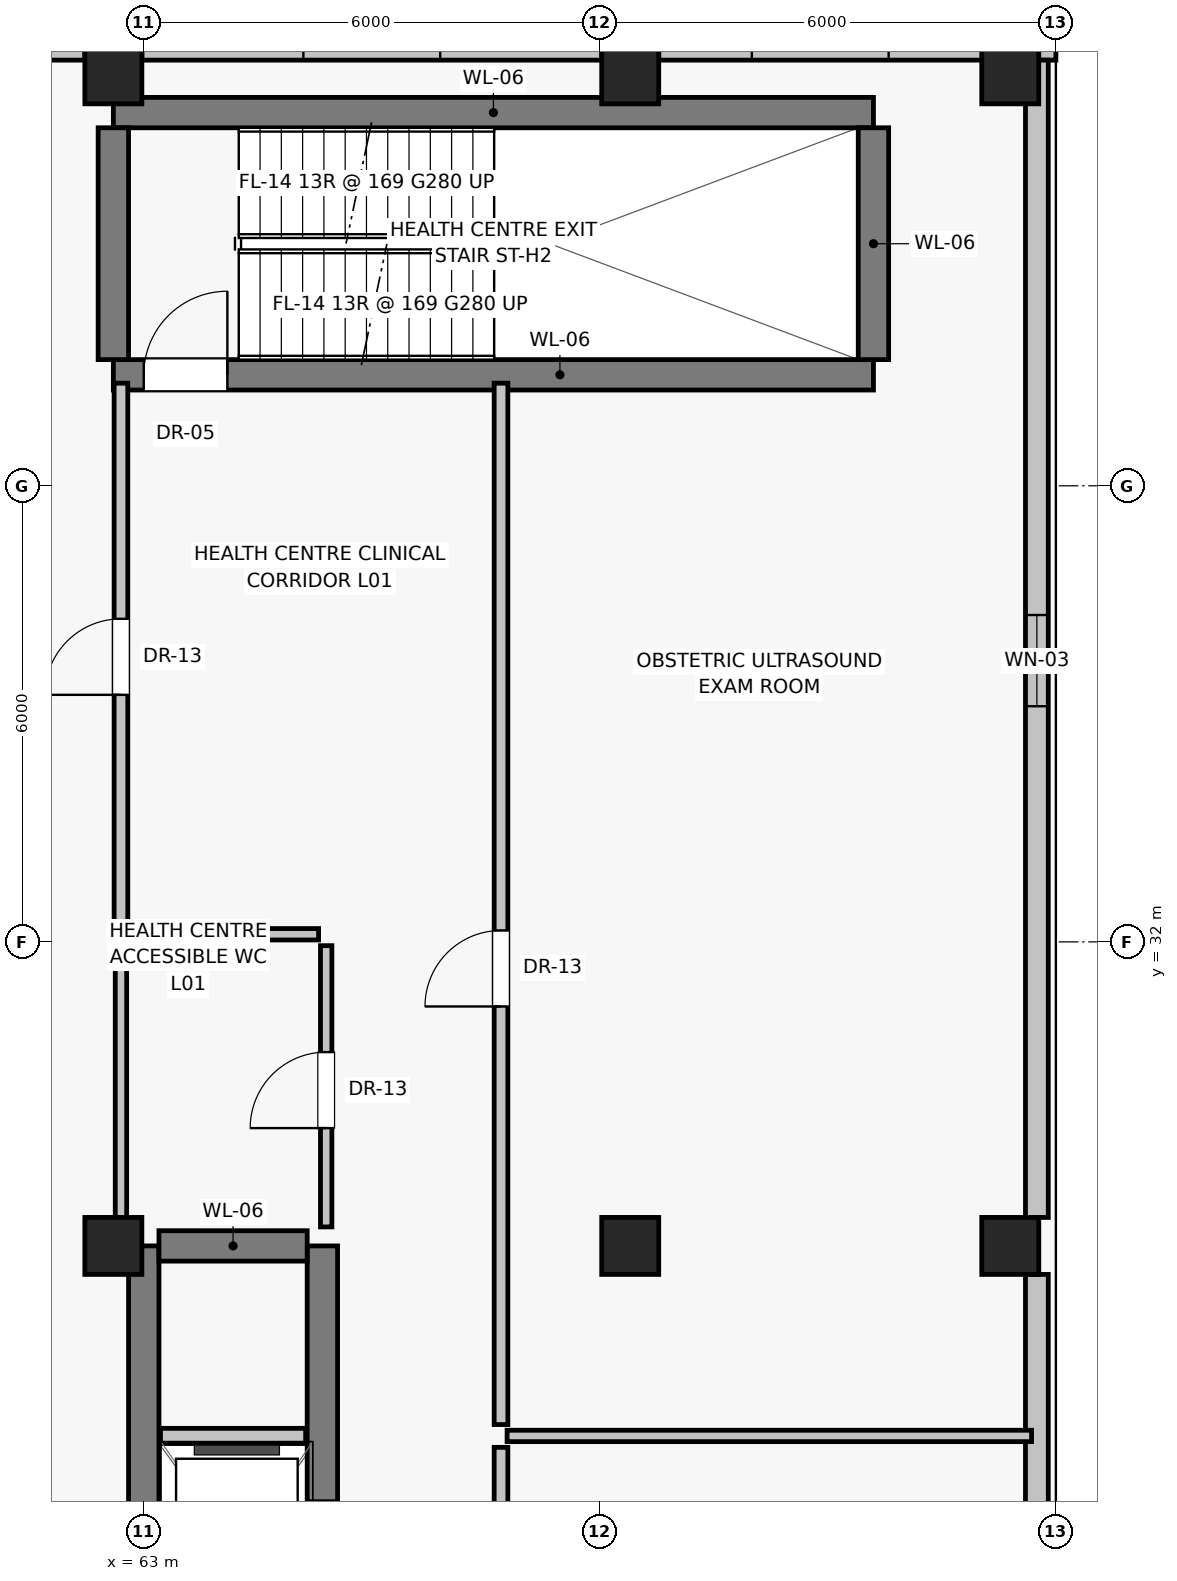
"""IFC4 building model, lengths in metres.
Left out: names, types, materials, properties, quantities, classifications, styles, units other than length and angle.
Written with IfcOpenShell. Run it as: python <this file> out.ifc"""

import sys

from ifc_helpers import new_model, si_unit, direction, frame, frame_2d, origin, origin_2d, place, context, subcontext, project, spatial, rectangle, extrude, source, transform, mapped, element, fill, save


model = new_model("IFC4")
c1 = context("Model", 3, precision=1e-05, world=origin(), true_north=direction((0.0, 1.0)))
c2 = subcontext(c1, "Body", "Model", "MODEL_VIEW")
j1 = project(units=[si_unit("LENGTHUNIT", "METRE"), si_unit("PLANEANGLEUNIT", "RADIAN")], contexts=[c1])
p1 = place(None, origin())
s1 = spatial("IfcSite", under=j1, at=p1, CompositionType="ELEMENT")
p2 = place(p1, origin())
s2 = spatial("IfcBuilding", under=s1, at=p2, CompositionType="ELEMENT")
p3 = place(p2, frame((0.0, 0.0, 5.2)))
s3 = spatial("IfcBuildingStorey", under=s2, at=p3, CompositionType="ELEMENT", Elevation=5.2)
for number, where, z_axis, x_axis in (
    (1, (62.6, 28.0, 0.0), (0.0, 0.0, 1.0), (1.0, 0.0, 0.0)),
    (2, (62.6, 43.4, 0.0), (0.0, 0.0, 1.0), (1.0, 0.0, 0.0)),
    (3, (69.4, 28.0, 0.0), (0.0, 0.0, 1.0), (1.0, 0.0, 0.0)),
    (4, (69.4, 43.4, 0.0), (0.0, 0.0, 1.0), (1.0, 0.0, 0.0)),
    (5, (74.4, 28.0, 0.0), (0.0, 0.0, 1.0), (1.0, 0.0, 0.0)),
    (6, (74.4, 43.4, 0.0), (0.0, 0.0, 1.0), (1.0, 0.0, 0.0)),
):
    element("IfcColumn", number, at=place(p3, frame(where, z_axis=z_axis, x_axis=x_axis)), inside=s3, PredefinedType="COLUMN", context=c2, shape_type="SweptSolid", body=[
        extrude(rectangle(XDim=0.75, YDim=0.75, at=origin_2d()), origin(), (0.0, 0.0, 1.0), 4.4),
    ])
p4 = place(p3, frame((75.0, 43.75, 0.0), z_axis=(0.0, 0.0, 1.0), x_axis=(-1.0, 0.0, 0.0)))
e7 = element("IfcWall", 7, at=p4, inside=s3, PredefinedType="SOLIDWALL", context=c2, shape_type="SweptSolid", body=[
    extrude(rectangle(XDim=5.225, YDim=0.3, at=frame_2d((2.613, 0.0))), origin(), (0.0, 0.0, 1.0), 3.35),
])
p5 = place(p4, frame((2.2, 0.0, 0.85)))
e8 = element("IfcOpeningElement", 8, at=p5, cuts=e7, PredefinedType="OPENING", context=c2, shape_type="SweptSolid", body=[
    extrude(rectangle(XDim=1.8, YDim=1.65, at=frame_2d((0.9, 0.825))), frame((0.0, 0.16, 0.0), z_axis=(0.0, -1.0, 0.0), x_axis=(1.0, 0.0, 0.0)), (0.0, 0.0, 1.0), 0.32),
])
p6 = place(p3, frame((69.025, 43.75, 0.0), z_axis=(0.0, 0.0, 1.0), x_axis=(-1.0, 0.0, 0.0)))
e9 = element("IfcWall", 9, at=p6, inside=s3, PredefinedType="SOLIDWALL", context=c2, shape_type="SweptSolid", body=[
    extrude(rectangle(XDim=6.05, YDim=0.3, at=frame_2d((3.025, 0.0))), origin(), (0.0, 0.0, 1.0), 3.35),
])
p7 = place(p6, frame((2.125, 0.0, 0.85)))
e10 = element("IfcOpeningElement", 10, at=p7, cuts=e9, PredefinedType="OPENING", context=c2, shape_type="SweptSolid", body=[
    extrude(rectangle(XDim=1.8, YDim=1.65, at=frame_2d((0.9, 0.825))), frame((0.0, 0.16, 0.0), z_axis=(0.0, -1.0, 0.0), x_axis=(1.0, 0.0, 0.0)), (0.0, 0.0, 1.0), 0.32),
])
p8 = place(p3, frame((62.225, 43.75, 0.0), z_axis=(0.0, 0.0, 1.0), x_axis=(-1.0, 0.0, 0.0)))
e11 = element("IfcWall", 11, at=p8, inside=s3, PredefinedType="SOLIDWALL", context=c2, shape_type="SweptSolid", body=[
    extrude(rectangle(XDim=5.225, YDim=0.3, at=frame_2d((2.613, 0.0))), origin(), (0.0, 0.0, 1.0), 3.35),
])
p9 = place(p8, frame((1.225, 0.0, 0.85)))
e12 = element("IfcOpeningElement", 12, at=p9, cuts=e11, PredefinedType="OPENING", context=c2, shape_type="SweptSolid", body=[
    extrude(rectangle(XDim=1.8, YDim=1.65, at=frame_2d((0.9, 0.825))), frame((0.0, 0.16, 0.0), z_axis=(0.0, -1.0, 0.0), x_axis=(1.0, 0.0, 0.0)), (0.0, 0.0, 1.0), 0.32),
])
p10 = place(p3, frame((74.75, 16.375, 0.0), z_axis=(0.0, 0.0, 1.0), x_axis=(0.0, 1.0, 0.0)))
e13 = element("IfcWall", 13, at=p10, inside=s3, PredefinedType="SOLIDWALL", context=c2, shape_type="SweptSolid", body=[
    extrude(rectangle(XDim=11.25, YDim=0.3, at=frame_2d((5.625, 0.0))), origin(), (0.0, 0.0, 1.0), 3.35),
])
p11 = place(p10, frame((5.025, 0.0, 0.95)))
e14 = element("IfcOpeningElement", 14, at=p11, cuts=e13, PredefinedType="OPENING", context=c2, shape_type="SweptSolid", body=[
    extrude(rectangle(XDim=1.2, YDim=1.5, at=frame_2d((0.6, 0.75))), frame((0.0, 0.16, 0.0), z_axis=(0.0, -1.0, 0.0), x_axis=(1.0, 0.0, 0.0)), (0.0, 0.0, 1.0), 0.32),
])
p12 = place(p3, frame((74.75, 28.375, 0.0), z_axis=(0.0, 0.0, 1.0), x_axis=(0.0, 1.0, 0.0)))
e15 = element("IfcWall", 15, at=p12, inside=s3, PredefinedType="SOLIDWALL", context=c2, shape_type="SweptSolid", body=[
    extrude(rectangle(XDim=15.225, YDim=0.3, at=frame_2d((7.613, 0.0))), origin(), (0.0, 0.0, 1.0), 3.35),
])
p13 = place(p12, frame((6.725, 0.0, 0.95)))
e16 = element("IfcOpeningElement", 16, at=p13, cuts=e15, PredefinedType="OPENING", context=c2, shape_type="SweptSolid", body=[
    extrude(rectangle(XDim=1.2, YDim=1.5, at=frame_2d((0.6, 0.75))), frame((0.0, 0.16, 0.0), z_axis=(0.0, -1.0, 0.0), x_axis=(1.0, 0.0, 0.0)), (0.0, 0.0, 1.0), 0.32),
])
p14 = place(p3, frame((63.0, 16.0, 0.0), z_axis=(0.0, 0.0, 1.0), x_axis=(0.0, 1.0, 0.0)))
e17 = element("IfcWall", 17, at=p14, inside=s3, PredefinedType="SHEAR", context=c2, shape_type="SweptSolid", body=[
    extrude(rectangle(XDim=12.0, YDim=0.4, at=frame_2d((6.0, 0.0))), origin(), (0.0, 0.0, 1.0), 4.1),
])
p15 = place(p3, frame((65.35, 16.0, 0.0), z_axis=(0.0, 0.0, 1.0), x_axis=(0.0, 1.0, 0.0)))
e18 = element("IfcWall", 18, at=p15, inside=s3, PredefinedType="SHEAR", context=c2, shape_type="SweptSolid", body=[
    extrude(rectangle(XDim=12.0, YDim=0.4, at=frame_2d((6.0, 0.0))), origin(), (0.0, 0.0, 1.0), 4.1),
])
p16 = place(p15, frame((3.35, 0.0, 0.0)))
e19 = element("IfcOpeningElement", 19, at=p16, cuts=e18, PredefinedType="OPENING", context=c2, shape_type="SweptSolid", body=[
    extrude(rectangle(XDim=1.3, YDim=2.25, at=frame_2d((0.65, 1.125))), frame((0.0, 0.21, 0.0), z_axis=(0.0, -1.0, 0.0), x_axis=(1.0, 0.0, 0.0)), (0.0, 0.0, 1.0), 0.42),
])
p17 = place(p15, frame((7.35, 0.0, 0.0)))
e20 = element("IfcOpeningElement", 20, at=p17, cuts=e18, PredefinedType="OPENING", context=c2, shape_type="SweptSolid", body=[
    extrude(rectangle(XDim=1.3, YDim=2.25, at=frame_2d((0.65, 1.125))), frame((0.0, 0.21, 0.0), z_axis=(0.0, -1.0, 0.0), x_axis=(1.0, 0.0, 0.0)), (0.0, 0.0, 1.0), 0.42),
])
p18 = place(p3, frame((63.2, 28.0, 0.0), z_axis=(0.0, 0.0, 1.0), x_axis=(1.0, 0.0, 0.0)))
e21 = element("IfcWall", 21, at=p18, inside=s3, PredefinedType="SHEAR", context=c2, shape_type="SweptSolid", body=[
    extrude(rectangle(XDim=1.95, YDim=0.4, at=frame_2d((0.975, 0.0))), origin(), (0.0, 0.0, 1.0), 4.1),
])
p19 = place(p3, frame((63.22, 25.5, 0.0), z_axis=(0.0, 0.0, 1.0), x_axis=(1.0, 0.0, 0.0)))
e22 = element("IfcWall", 22, at=p19, inside=s3, PredefinedType="SOLIDWALL", context=c2, shape_type="SweptSolid", body=[
    extrude(rectangle(XDim=1.91, YDim=0.2, at=frame_2d((0.955, 0.0))), origin(), (0.0, 0.0, 1.0), 4.1),
])
p20 = place(p3, frame((62.6, 39.46, 0.0), z_axis=(0.0, 0.0, 1.0), x_axis=(1.0, 0.0, 0.0)))
e23 = element("IfcWall", 23, at=p20, inside=s3, PredefinedType="SHEAR", context=c2, shape_type="SweptSolid", body=[
    extrude(rectangle(XDim=10.0, YDim=0.4, at=frame_2d((5.0, 0.0))), origin(), (0.0, 0.0, 1.0), 4.1),
])
p21 = place(p20, frame((0.4, 0.0, 0.0)))
e24 = element("IfcOpeningElement", 24, at=p21, cuts=e23, PredefinedType="OPENING", context=c2, shape_type="SweptSolid", body=[
    extrude(rectangle(XDim=1.1, YDim=2.03, at=frame_2d((0.55, 1.015))), frame((0.0, 0.21, 0.0), z_axis=(0.0, -1.0, 0.0), x_axis=(1.0, 0.0, 0.0)), (0.0, 0.0, 1.0), 0.42),
])
p22 = place(p3, frame((62.6, 42.91, 0.0), z_axis=(0.0, 0.0, 1.0), x_axis=(1.0, 0.0, 0.0)))
e25 = element("IfcWall", 25, at=p22, inside=s3, PredefinedType="SHEAR", context=c2, shape_type="SweptSolid", body=[
    extrude(rectangle(XDim=10.0, YDim=0.4, at=frame_2d((5.0, 0.0))), origin(), (0.0, 0.0, 1.0), 4.1),
])
for number, where, z_axis, x_axis in (
    (26, (62.6, 39.66, 0.0), (0.0, 0.0, 1.0), (0.0, 1.0, 0.0)),
    (27, (72.6, 39.66, 0.0), (0.0, 0.0, 1.0), (0.0, 1.0, 0.0)),
):
    element("IfcWall", number, at=place(p3, frame(where, z_axis=z_axis, x_axis=x_axis)), inside=s3, PredefinedType="SHEAR", context=c2, shape_type="SweptSolid", body=[
        extrude(rectangle(XDim=3.05, YDim=0.4, at=frame_2d((1.525, 0.0))), origin(), (0.0, 0.0, 1.0), 4.1),
    ])
p23 = place(p3, frame((62.8, 32.1, 0.0), z_axis=(0.0, 0.0, 1.0), x_axis=(1.0, 0.0, 0.0)))
e28 = element("IfcWall", 28, at=p23, inside=s3, PredefinedType="PARTITIONING", context=c2, shape_type="SweptSolid", body=[
    extrude(rectangle(XDim=2.5, YDim=0.15, at=frame_2d((1.25, 0.0))), origin(), (0.0, 0.0, 1.0), 4.1),
])
p24 = place(p3, frame((62.7, 28.2, 0.0), z_axis=(0.0, 0.0, 1.0), x_axis=(0.0, 1.0, 0.0)))
e29 = element("IfcWall", 29, at=p24, inside=s3, PredefinedType="PARTITIONING", context=c2, shape_type="SweptSolid", body=[
    extrude(rectangle(XDim=3.8, YDim=0.15, at=frame_2d((1.9, 0.0))), origin(), (0.0, 0.0, 1.0), 3.5),
])
p25 = place(p3, frame((65.4, 28.25, 0.0), z_axis=(0.0, 0.0, 1.0), x_axis=(0.0, 1.0, 0.0)))
e30 = element("IfcWall", 30, at=p25, inside=s3, PredefinedType="PARTITIONING", context=c2, shape_type="SweptSolid", body=[
    extrude(rectangle(XDim=3.7, YDim=0.15, at=frame_2d((1.85, 0.0))), origin(), (0.0, 0.0, 1.0), 4.1),
])
p26 = place(p25, frame((1.3, 0.0, 0.0)))
e31 = element("IfcOpeningElement", 31, at=p26, cuts=e30, PredefinedType="OPENING", context=c2, shape_type="SweptSolid", body=[
    extrude(rectangle(XDim=1.0, YDim=2.01, at=frame_2d((0.5, 1.005))), frame((0.0, 0.085, 0.0), z_axis=(0.0, -1.0, 0.0), x_axis=(1.0, 0.0, 0.0)), (0.0, 0.0, 1.0), 0.17),
])
p27 = place(p3, frame((62.7, 32.25, 0.0), z_axis=(0.0, 0.0, 1.0), x_axis=(0.0, 1.0, 0.0)))
e32 = element("IfcWall", 32, at=p27, inside=s3, PredefinedType="PARTITIONING", context=c2, shape_type="SweptSolid", body=[
    extrude(rectangle(XDim=7.1, YDim=0.18, at=frame_2d((3.55, 0.0))), origin(), (0.0, 0.0, 1.0), 3.5),
])
p28 = place(p27, frame((3.0, 0.0, 0.0)))
e33 = element("IfcOpeningElement", 33, at=p28, cuts=e32, PredefinedType="OPENING", context=c2, shape_type="SweptSolid", body=[
    extrude(rectangle(XDim=1.0, YDim=2.01, at=frame_2d((0.5, 1.005))), frame((0.0, 0.1, 0.0), z_axis=(0.0, -1.0, 0.0), x_axis=(1.0, 0.0, 0.0)), (0.0, 0.0, 1.0), 0.2),
])
p29 = place(p3, frame((67.7, 8.65, 0.0), z_axis=(0.0, 0.0, 1.0), x_axis=(0.0, 1.0, 0.0)))
e34 = element("IfcWall", 34, at=p29, inside=s3, PredefinedType="PARTITIONING", context=c2, shape_type="SweptSolid", body=[
    extrude(rectangle(XDim=16.7, YDim=0.18, at=frame_2d((8.35, 0.0))), origin(), (0.0, 0.0, 1.0), 4.1),
])
p30 = place(p29, frame((5.5, 0.0, 0.0)))
e35 = element("IfcOpeningElement", 35, at=p30, cuts=e34, PredefinedType="OPENING", context=c2, shape_type="SweptSolid", body=[
    extrude(rectangle(XDim=1.0, YDim=2.01, at=frame_2d((0.5, 1.005))), frame((0.0, 0.1, 0.0), z_axis=(0.0, -1.0, 0.0), x_axis=(1.0, 0.0, 0.0)), (0.0, 0.0, 1.0), 0.2),
])
p31 = place(p3, frame((67.7, 25.65, 0.0), z_axis=(0.0, 0.0, 1.0), x_axis=(0.0, 1.0, 0.0)))
e36 = element("IfcWall", 36, at=p31, inside=s3, PredefinedType="PARTITIONING", context=c2, shape_type="SweptSolid", body=[
    extrude(rectangle(XDim=13.7, YDim=0.18, at=frame_2d((6.85, 0.0))), origin(), (0.0, 0.0, 1.0), 4.1),
])
p32 = place(p31, frame((5.5, 0.0, 0.0)))
e37 = element("IfcOpeningElement", 37, at=p32, cuts=e36, PredefinedType="OPENING", context=c2, shape_type="SweptSolid", body=[
    extrude(rectangle(XDim=1.0, YDim=2.01, at=frame_2d((0.5, 1.005))), frame((0.0, 0.1, 0.0), z_axis=(0.0, -1.0, 0.0), x_axis=(1.0, 0.0, 0.0)), (0.0, 0.0, 1.0), 0.2),
])
p33 = place(p3, frame((67.78, 25.5, 0.0), z_axis=(0.0, 0.0, 1.0), x_axis=(1.0, 0.0, 0.0)))
e38 = element("IfcWall", 38, at=p33, inside=s3, PredefinedType="PARTITIONING", context=c2, shape_type="SweptSolid", body=[
    extrude(rectangle(XDim=6.9, YDim=0.15, at=frame_2d((3.45, 0.0))), origin(), (0.0, 0.0, 1.0), 4.1),
])
m1 = source(origin(), c2, "Body", "SweptSolid", [
    extrude(rectangle(XDim=1.2, YDim=1.5, at=frame_2d((0.6, 0.75))), frame((0.0, 0.03, 0.0), z_axis=(0.0, -1.0, 0.0), x_axis=(1.0, 0.0, 0.0)), (0.0, 0.0, 1.0), 0.06),
])
p34 = place(p13, origin())
e39 = element("IfcWindow", 39, at=p34, inside=s3, PartitioningType="SINGLE_PANEL", PredefinedType="WINDOW", context=c2, shape_type="MappedRepresentation", body=[
    mapped(m1, transform((0.0, 0.0, 0.0), scale=1.0)),
])
fill(e16, e39)
m2 = source(origin(), c2, "Body", "SweptSolid", [
    extrude(rectangle(XDim=1.3, YDim=2.25, at=frame_2d((0.65, 1.125))), frame((0.0, 0.025, 0.0), z_axis=(0.0, -1.0, 0.0), x_axis=(1.0, 0.0, 0.0)), (0.0, 0.0, 1.0), 0.05),
])
p35 = place(p17, origin())
e40 = element("IfcDoor", 40, at=p35, inside=s3, OperationType="SLIDING_TO_LEFT", PredefinedType="DOOR", context=c2, shape_type="MappedRepresentation", body=[
    mapped(m2, transform((0.0, 0.0, 0.0), scale=1.0)),
])
fill(e20, e40)
m3 = source(origin(), c2, "Body", "SweptSolid", [
    extrude(rectangle(XDim=1.1, YDim=2.03, at=frame_2d((0.55, 1.015))), frame((0.0, 0.025, 0.0), z_axis=(0.0, -1.0, 0.0), x_axis=(1.0, 0.0, 0.0)), (0.0, 0.0, 1.0), 0.05),
])
p36 = place(p21, origin())
e41 = element("IfcDoor", 41, at=p36, inside=s3, OperationType="SINGLE_SWING_RIGHT", PredefinedType="DOOR", context=c2, shape_type="MappedRepresentation", body=[
    mapped(m3, transform((0.0, 0.0, 0.0), scale=1.0)),
])
fill(e24, e41)
m4 = source(origin(), c2, "Body", "SweptSolid", [
    extrude(rectangle(XDim=1.0, YDim=2.01, at=frame_2d((0.5, 1.005))), frame((0.0, 0.025, 0.0), z_axis=(0.0, -1.0, 0.0), x_axis=(1.0, 0.0, 0.0)), (0.0, 0.0, 1.0), 0.05),
])
p37 = place(p26, origin())
e42 = element("IfcDoor", 42, at=p37, inside=s3, OperationType="SINGLE_SWING_LEFT", PredefinedType="DOOR", context=c2, shape_type="MappedRepresentation", body=[
    mapped(m4, transform((0.0, 0.0, 0.0), scale=1.0)),
])
fill(e31, e42)
p38 = place(p28, origin())
e43 = element("IfcDoor", 43, at=p38, inside=s3, OperationType="SINGLE_SWING_LEFT", PredefinedType="DOOR", context=c2, shape_type="MappedRepresentation", body=[
    mapped(m4, transform((0.0, 0.0, 0.0), scale=1.0)),
])
fill(e33, e43)
p39 = place(p32, origin())
e44 = element("IfcDoor", 44, at=p39, inside=s3, OperationType="SINGLE_SWING_LEFT", PredefinedType="DOOR", context=c2, shape_type="MappedRepresentation", body=[
    mapped(m4, transform((0.0, 0.0, 0.0), scale=1.0)),
])
fill(e37, e44)
save(model, sys.argv[1])
